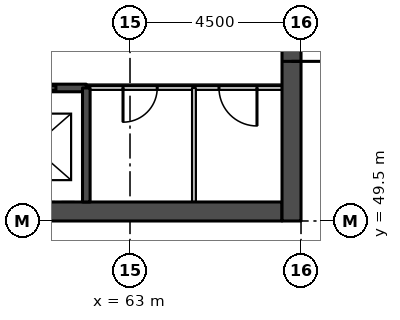
"""IFC4 building model, lengths in metres.
Left out: names, types, materials, properties, quantities, classifications, styles, units other than length and angle.
Written with IfcOpenShell. Run it as: python <this file> out.ifc"""

import sys

from ifc_helpers import new_model, si_unit, direction, frame, frame_2d, origin, place, context, subcontext, project, spatial, rectangle, extrude, element, fill, save


model = new_model("IFC4")
c1 = context("Model", 3, precision=1e-05, world=origin(), true_north=direction((0.0, 1.0)))
c2 = subcontext(c1, "Body", "Model", "MODEL_VIEW")
j1 = project(units=[si_unit("LENGTHUNIT", "METRE"), si_unit("PLANEANGLEUNIT", "RADIAN")], contexts=[c1])
p1 = place(None, origin())
s1 = spatial("IfcSite", under=j1, at=p1, CompositionType="ELEMENT")
p2 = place(p1, origin())
s2 = spatial("IfcBuilding", under=s1, at=p2, CompositionType="ELEMENT")
p3 = place(p2, frame((0.0, 0.0, -4.5)))
s3 = spatial("IfcBuildingStorey", under=s2, at=p3, CompositionType="ELEMENT", Elevation=-4.5)
p4 = place(p3, frame((45.5, 49.75, 0.0), z_axis=(0.0, 0.0, 1.0), x_axis=(1.0, 0.0, 0.0)))
e1 = element("IfcWall", 1, at=p4, inside=s3, PredefinedType="SHEAR", context=c2, shape_type="SweptSolid", body=[
    extrude(rectangle(XDim=21.5, YDim=0.5, at=frame_2d((10.75, 0.0))), origin(), (0.0, 0.0, 1.0), 4.5),
])
p5 = place(p3, frame((67.25, 49.5, 0.0), z_axis=(0.0, 0.0, 1.0), x_axis=(0.0, 1.0, 0.0)))
e2 = element("IfcWall", 2, at=p5, inside=s3, PredefinedType="SHEAR", context=c2, shape_type="SweptSolid", body=[
    extrude(rectangle(XDim=22.5, YDim=0.5, at=frame_2d((11.25, 0.0))), origin(), (0.0, 0.0, 1.0), 4.5),
])
p6 = place(p5, frame((4.2, 0.0, 0.0)))
e3 = element("IfcOpeningElement", 3, at=p6, cuts=e2, PredefinedType="OPENING", context=c2, shape_type="SweptSolid", body=[
    extrude(rectangle(XDim=1.8, YDim=2.1, at=frame_2d((0.9, 1.05))), frame((0.0, 0.26, 0.0), z_axis=(0.0, -1.0, 0.0), x_axis=(1.0, 0.0, 0.0)), (0.0, 0.0, 1.0), 0.52),
])
p7 = place(p5, frame((6.9, 0.0, 0.0)))
e4 = element("IfcOpeningElement", 4, at=p7, cuts=e2, PredefinedType="OPENING", context=c2, shape_type="SweptSolid", body=[
    extrude(rectangle(XDim=1.1, YDim=2.1, at=frame_2d((0.55, 1.05))), frame((0.0, 0.26, 0.0), z_axis=(0.0, -1.0, 0.0), x_axis=(1.0, 0.0, 0.0)), (0.0, 0.0, 1.0), 0.52),
])
p8 = place(p5, frame((13.6, 0.0, 0.0)))
e5 = element("IfcOpeningElement", 5, at=p8, cuts=e2, PredefinedType="OPENING", context=c2, shape_type="SweptSolid", body=[
    extrude(rectangle(XDim=1.1, YDim=2.1, at=frame_2d((0.55, 1.05))), frame((0.0, 0.26, 0.0), z_axis=(0.0, -1.0, 0.0), x_axis=(1.0, 0.0, 0.0)), (0.0, 0.0, 1.0), 0.52),
])
p9 = place(p5, frame((16.5, 0.0, 0.0)))
e6 = element("IfcOpeningElement", 6, at=p9, cuts=e2, PredefinedType="OPENING", context=c2, shape_type="SweptSolid", body=[
    extrude(rectangle(XDim=1.8, YDim=2.1, at=frame_2d((0.9, 1.05))), frame((0.0, 0.26, 0.0), z_axis=(0.0, -1.0, 0.0), x_axis=(1.0, 0.0, 0.0)), (0.0, 0.0, 1.0), 0.52),
])
p10 = place(p3, frame((61.85, 53.0, 0.0), z_axis=(0.0, 0.0, 1.0), x_axis=(1.0, 0.0, 0.0)))
e7 = element("IfcWall", 7, at=p10, inside=s3, PredefinedType="PARTITIONING", context=c2, shape_type="SweptSolid", body=[
    extrude(rectangle(XDim=5.15, YDim=0.1, at=frame_2d((2.575, 0.0))), origin(), (0.0, 0.0, 1.0), 4.1),
])
p11 = place(p10, frame((3.491, 0.0, 0.0)))
e8 = element("IfcOpeningElement", 8, at=p11, cuts=e7, PredefinedType="OPENING", context=c2, shape_type="SweptSolid", body=[
    extrude(rectangle(XDim=1.0, YDim=2.1, at=frame_2d((0.5, 1.05))), frame((0.0, 0.06, 0.0), z_axis=(0.0, -1.0, 0.0), x_axis=(1.0, 0.0, 0.0)), (0.0, 0.0, 1.0), 0.12),
])
p12 = place(p10, frame((0.966, 0.0, 0.0)))
e9 = element("IfcOpeningElement", 9, at=p12, cuts=e7, PredefinedType="OPENING", context=c2, shape_type="SweptSolid", body=[
    extrude(rectangle(XDim=0.9, YDim=2.1, at=frame_2d((0.45, 1.05))), frame((0.0, 0.06, 0.0), z_axis=(0.0, -1.0, 0.0), x_axis=(1.0, 0.0, 0.0)), (0.0, 0.0, 1.0), 0.12),
])
p13 = place(p3, frame((50.65, 53.0, 0.0), z_axis=(0.0, 0.0, 1.0), x_axis=(1.0, 0.0, 0.0)))
e10 = element("IfcWall", 10, at=p13, inside=s3, PredefinedType="SOLIDWALL", context=c2, shape_type="SweptSolid", body=[
    extrude(rectangle(XDim=11.2, YDim=0.2, at=frame_2d((5.6, 0.0))), origin(), (0.0, 0.0, 1.0), 4.1),
])
p14 = place(p13, frame((0.8, 0.0, 0.0)))
e11 = element("IfcOpeningElement", 11, at=p14, cuts=e10, PredefinedType="OPENING", context=c2, shape_type="SweptSolid", body=[
    extrude(rectangle(XDim=1.2, YDim=2.1, at=frame_2d((0.6, 1.05))), frame((0.0, 0.11, 0.0), z_axis=(0.0, -1.0, 0.0), x_axis=(1.0, 0.0, 0.0)), (0.0, 0.0, 1.0), 0.22),
])
p15 = place(p13, frame((3.6, 0.0, 0.0)))
e12 = element("IfcOpeningElement", 12, at=p15, cuts=e10, PredefinedType="OPENING", context=c2, shape_type="SweptSolid", body=[
    extrude(rectangle(XDim=1.2, YDim=2.1, at=frame_2d((0.6, 1.05))), frame((0.0, 0.11, 0.0), z_axis=(0.0, -1.0, 0.0), x_axis=(1.0, 0.0, 0.0)), (0.0, 0.0, 1.0), 0.22),
])
p16 = place(p13, frame((6.4, 0.0, 0.0)))
e13 = element("IfcOpeningElement", 13, at=p16, cuts=e10, PredefinedType="OPENING", context=c2, shape_type="SweptSolid", body=[
    extrude(rectangle(XDim=1.2, YDim=2.1, at=frame_2d((0.6, 1.05))), frame((0.0, 0.11, 0.0), z_axis=(0.0, -1.0, 0.0), x_axis=(1.0, 0.0, 0.0)), (0.0, 0.0, 1.0), 0.22),
])
p17 = place(p13, frame((9.2, 0.0, 0.0)))
e14 = element("IfcOpeningElement", 14, at=p17, cuts=e10, PredefinedType="OPENING", context=c2, shape_type="SweptSolid", body=[
    extrude(rectangle(XDim=1.2, YDim=2.1, at=frame_2d((0.6, 1.05))), frame((0.0, 0.11, 0.0), z_axis=(0.0, -1.0, 0.0), x_axis=(1.0, 0.0, 0.0)), (0.0, 0.0, 1.0), 0.22),
])
p18 = place(p3, frame((61.85, 50.0, 0.0), z_axis=(0.0, 0.0, 1.0), x_axis=(0.0, 1.0, 0.0)))
e15 = element("IfcWall", 15, at=p18, inside=s3, PredefinedType="SOLIDWALL", context=c2, shape_type="SweptSolid", body=[
    extrude(rectangle(XDim=3.0, YDim=0.2, at=frame_2d((1.5, 0.0))), origin(), (0.0, 0.0, 1.0), 4.1),
])
p19 = place(p3, frame((64.683, 50.0, 0.0), z_axis=(0.0, 0.0, 1.0), x_axis=(0.0, 1.0, 0.0)))
e16 = element("IfcWall", 16, at=p19, inside=s3, PredefinedType="PARTITIONING", context=c2, shape_type="SweptSolid", body=[
    extrude(rectangle(XDim=3.0, YDim=0.1, at=frame_2d((1.5, 0.0))), origin(), (0.0, 0.0, 1.0), 4.1),
])
p20 = place(p17, origin())
e17 = element("IfcDoor", 17, at=p20, inside=s3, OperationType="DOUBLE_DOOR_SLIDING", PredefinedType="DOOR", context=c2, shape_type="SweptSolid", body=[
    extrude(rectangle(XDim=1.2, YDim=2.1, at=frame_2d((0.6, 1.05))), frame((0.0, 0.025, 0.0), z_axis=(0.0, -1.0, 0.0), x_axis=(1.0, 0.0, 0.0)), (0.0, 0.0, 1.0), 0.05),
])
fill(e14, e17)
p21 = place(p6, frame((1.8, 0.0, 0.0), z_axis=(0.0, 0.0, 1.0), x_axis=(-1.0, 0.0, 0.0)))
e18 = element("IfcDoor", 18, at=p21, inside=s3, OperationType="SINGLE_SWING_RIGHT", PredefinedType="DOOR", context=c2, shape_type="SweptSolid", body=[
    extrude(rectangle(XDim=1.8, YDim=2.1, at=frame_2d((0.9, 1.05))), frame((0.0, 0.025, 0.0), z_axis=(0.0, -1.0, 0.0), x_axis=(1.0, 0.0, 0.0)), (0.0, 0.0, 1.0), 0.05),
])
fill(e3, e18)
p22 = place(p11, frame((1.0, 0.0, 0.0), z_axis=(0.0, 0.0, 1.0), x_axis=(-1.0, 0.0, 0.0)))
e19 = element("IfcDoor", 19, at=p22, inside=s3, OperationType="SINGLE_SWING_LEFT", PredefinedType="DOOR", context=c2, shape_type="SweptSolid", body=[
    extrude(rectangle(XDim=1.0, YDim=2.1, at=frame_2d((0.5, 1.05))), frame((0.0, 0.025, 0.0), z_axis=(0.0, -1.0, 0.0), x_axis=(1.0, 0.0, 0.0)), (0.0, 0.0, 1.0), 0.05),
])
fill(e8, e19)
p23 = place(p12, frame((0.9, 0.0, 0.0), z_axis=(0.0, 0.0, 1.0), x_axis=(-1.0, 0.0, 0.0)))
e20 = element("IfcDoor", 20, at=p23, inside=s3, OperationType="SINGLE_SWING_RIGHT", PredefinedType="DOOR", context=c2, shape_type="SweptSolid", body=[
    extrude(rectangle(XDim=0.9, YDim=2.1, at=frame_2d((0.45, 1.05))), frame((0.0, 0.025, 0.0), z_axis=(0.0, -1.0, 0.0), x_axis=(1.0, 0.0, 0.0)), (0.0, 0.0, 1.0), 0.05),
])
fill(e9, e20)
save(model, sys.argv[1])
